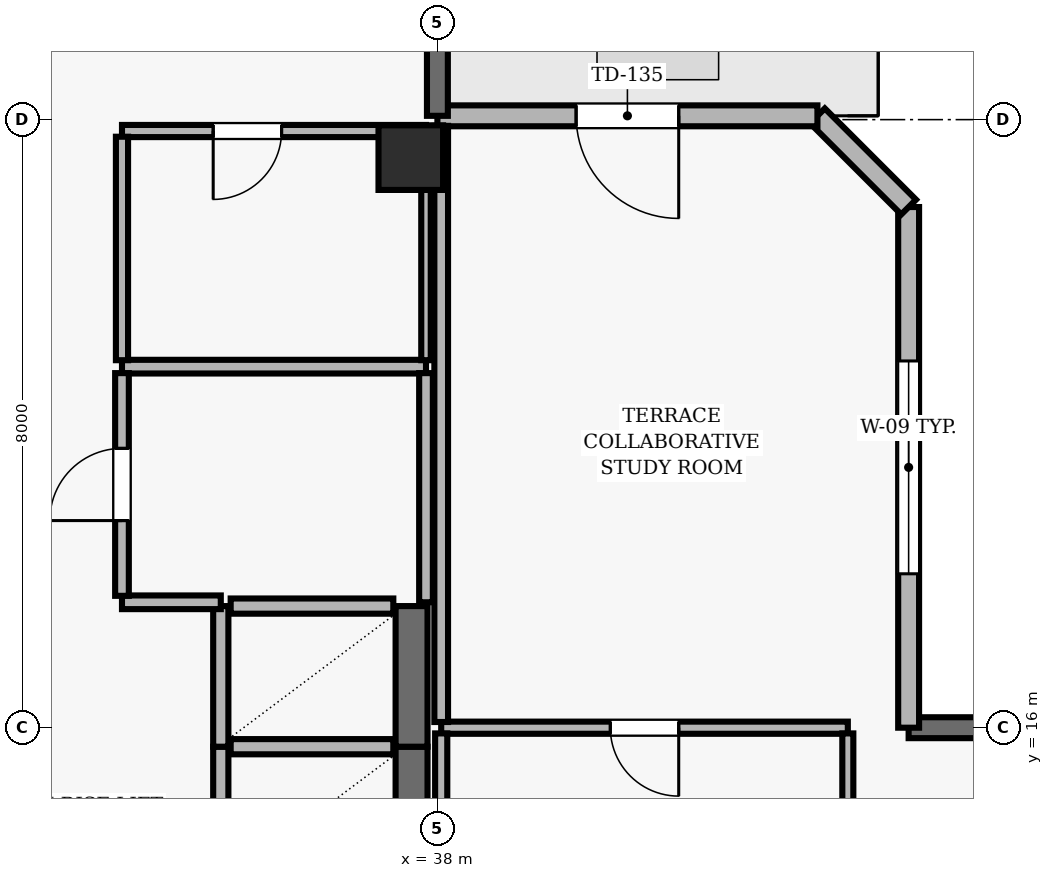
"""IFC4 building model, lengths in metres.
Left out: names, types, materials, properties, quantities, classifications, styles, units other than length and angle.
Written with IfcOpenShell. Run it as: python <this file> out.ifc"""

import sys

from ifc_helpers import new_model, si_unit, direction, frame, frame_2d, origin, origin_2d, place, context, subcontext, project, spatial, rectangle, extrude, element, fill, save


model = new_model("IFC4")
c1 = context("Model", 3, precision=1e-05, world=origin(), true_north=direction((0.0, 1.0)))
c2 = subcontext(c1, "Body", "Model", "MODEL_VIEW")
j1 = project(units=[si_unit("LENGTHUNIT", "METRE"), si_unit("PLANEANGLEUNIT", "RADIAN")], contexts=[c1])
p1 = place(None, origin())
s1 = spatial("IfcSite", under=j1, at=p1, CompositionType="ELEMENT")
p2 = place(p1, origin())
s2 = spatial("IfcBuilding", under=s1, at=p2, CompositionType="ELEMENT")
p3 = place(p2, frame((0.0, 0.0, 259.9)))
s3 = spatial("IfcBuildingStorey", under=s2, at=p3, CompositionType="ELEMENT", Elevation=259.9)
p4 = place(p3, frame((37.65, 23.5, 0.0), z_axis=(0.0, 0.0, 1.0), x_axis=(1.0, 0.0, 0.0)))
e1 = element("IfcColumn", 1, at=p4, inside=s3, PredefinedType="COLUMN", context=c2, shape_type="SweptSolid", body=[
    extrude(rectangle(XDim=0.85, YDim=0.85, at=origin_2d()), origin(), (0.0, 0.0, 1.0), 3.9),
])
p5 = place(p3, frame((57.3, 16.0, 0.0), z_axis=(0.0, 0.0, 1.0), x_axis=(-1.0, 0.0, 0.0)))
e2 = element("IfcWall", 2, at=p5, inside=s3, PredefinedType="SOLIDWALL", context=c2, shape_type="SweptSolid", body=[
    extrude(rectangle(XDim=13.1, YDim=0.275, at=frame_2d((6.55, 0.0))), origin(), (0.0, 0.0, 1.0), 3.69),
])
p6 = place(p5, frame((7.83, 0.0, 0.0)))
e3 = element("IfcOpeningElement", 3, at=p6, cuts=e2, PredefinedType="OPENING", context=c2, shape_type="SweptSolid", body=[
    extrude(rectangle(XDim=1.0, YDim=2.2, at=frame_2d((0.5, 1.1))), frame((0.0, 0.147, 0.0), z_axis=(0.0, -1.0, 0.0), x_axis=(1.0, 0.0, 0.0)), (0.0, 0.0, 1.0), 0.295),
])
p7 = place(p5, frame((2.075, 0.0, 0.9)))
e4 = element("IfcOpeningElement", 4, at=p7, cuts=e2, PredefinedType="OPENING", context=c2, shape_type="SweptSolid", body=[
    extrude(rectangle(XDim=2.4, YDim=1.8, at=frame_2d((1.2, 0.9))), frame((0.0, 0.147, 0.0), z_axis=(0.0, -1.0, 0.0), x_axis=(1.0, 0.0, 0.0)), (0.0, 0.0, 1.0), 0.295),
])
p8 = place(p5, frame((9.525, 0.0, 0.9)))
e5 = element("IfcOpeningElement", 5, at=p8, cuts=e2, PredefinedType="OPENING", context=c2, shape_type="SweptSolid", body=[
    extrude(rectangle(XDim=2.4, YDim=1.8, at=frame_2d((1.2, 0.9))), frame((0.0, 0.147, 0.0), z_axis=(0.0, -1.0, 0.0), x_axis=(1.0, 0.0, 0.0)), (0.0, 0.0, 1.0), 0.295),
])
p9 = place(p3, frame((44.2, 16.0, 0.0), z_axis=(0.0, 0.0, 1.0), x_axis=(0.0, 1.0, 0.0)))
e6 = element("IfcWall", 6, at=p9, inside=s3, PredefinedType="SOLIDWALL", context=c2, shape_type="SweptSolid", body=[
    extrude(rectangle(XDim=6.85, YDim=0.275, at=frame_2d((3.425, 0.0))), origin(), (0.0, 0.0, 1.0), 3.69),
])
p10 = place(p9, frame((2.025, 0.0, 0.9)))
e7 = element("IfcOpeningElement", 7, at=p10, cuts=e6, PredefinedType="OPENING", context=c2, shape_type="SweptSolid", body=[
    extrude(rectangle(XDim=2.8, YDim=1.8, at=frame_2d((1.4, 0.9))), frame((0.0, 0.147, 0.0), z_axis=(0.0, -1.0, 0.0), x_axis=(1.0, 0.0, 0.0)), (0.0, 0.0, 1.0), 0.295),
])
p11 = place(p3, frame((44.2, 22.85, 0.0), z_axis=(0.0, 0.0, 1.0), x_axis=(-0.707106781187, 0.707106781187, 0.0)))
e8 = element("IfcWall", 8, at=p11, inside=s3, PredefinedType="SOLIDWALL", context=c2, shape_type="SweptSolid", body=[
    extrude(rectangle(XDim=1.697, YDim=0.275, at=frame_2d((0.849, 0.0))), origin(), (0.0, 0.0, 1.0), 3.69),
])
p12 = place(p3, frame((43.0, 24.05, 0.0), z_axis=(0.0, 0.0, 1.0), x_axis=(-1.0, 0.0, 0.0)))
e9 = element("IfcWall", 9, at=p12, inside=s3, PredefinedType="SOLIDWALL", context=c2, shape_type="SweptSolid", body=[
    extrude(rectangle(XDim=5.0, YDim=0.275, at=frame_2d((2.5, 0.0))), origin(), (0.0, 0.0, 1.0), 3.69),
])
p13 = place(p12, frame((1.825, 0.0, 0.0)))
e10 = element("IfcOpeningElement", 10, at=p13, cuts=e9, PredefinedType="OPENING", context=c2, shape_type="SweptSolid", body=[
    extrude(rectangle(XDim=1.35, YDim=2.2, at=frame_2d((0.675, 1.1))), frame((0.0, 0.147, 0.0), z_axis=(0.0, -1.0, 0.0), x_axis=(1.0, 0.0, 0.0)), (0.0, 0.0, 1.0), 0.295),
])
p14 = place(p3, frame((38.0, 24.05, 0.0), z_axis=(0.0, 0.0, 1.0), x_axis=(0.0, 1.0, 0.0)))
e11 = element("IfcWall", 11, at=p14, inside=s3, PredefinedType="SOLIDWALL", context=c2, shape_type="SweptSolid", body=[
    extrude(rectangle(XDim=11.25, YDim=0.275, at=frame_2d((5.625, 0.0))), origin(), (0.0, 0.0, 1.0), 3.69),
])
p15 = place(p14, frame((8.15, 0.0, 0.0)))
e12 = element("IfcOpeningElement", 12, at=p15, cuts=e11, PredefinedType="OPENING", context=c2, shape_type="SweptSolid", body=[
    extrude(rectangle(XDim=1.0, YDim=2.2, at=frame_2d((0.5, 1.1))), frame((0.0, 0.147, 0.0), z_axis=(0.0, -1.0, 0.0), x_axis=(1.0, 0.0, 0.0)), (0.0, 0.0, 1.0), 0.295),
])
p16 = place(p3, frame((35.15, 15.75, 0.0), z_axis=(0.0, 0.0, 1.0), x_axis=(0.0, -1.0, 0.0)))
e13 = element("IfcWall", 13, at=p16, inside=s3, PredefinedType="SOLIDWALL", context=c2, shape_type="SweptSolid", body=[
    extrude(rectangle(XDim=1.85, YDim=0.2, at=frame_2d((0.925, 0.0))), origin(), (0.0, 0.0, 1.0), 3.69),
])
p17 = place(p3, frame((37.66, 13.9, 0.0), z_axis=(0.0, 0.0, 1.0), x_axis=(0.0, 1.0, 0.0)))
e14 = element("IfcWall", 14, at=p17, inside=s3, PredefinedType="SHEAR", context=c2, shape_type="SweptSolid", body=[
    extrude(rectangle(XDim=1.85, YDim=0.42, at=frame_2d((0.925, 0.0))), origin(), (0.0, 0.0, 1.0), 3.69),
])
p18 = place(p3, frame((37.42, 15.75, 0.0), z_axis=(0.0, 0.0, 1.0), x_axis=(-1.0, 0.0, 0.0)))
e15 = element("IfcWall", 15, at=p18, inside=s3, PredefinedType="SOLIDWALL", context=c2, shape_type="SweptSolid", body=[
    extrude(rectangle(XDim=2.14, YDim=0.2, at=frame_2d((1.07, 0.0))), origin(), (0.0, 0.0, 1.0), 3.69),
])
p19 = place(p3, frame((35.15, 17.6, 0.0), z_axis=(0.0, 0.0, 1.0), x_axis=(0.0, -1.0, 0.0)))
e16 = element("IfcWall", 16, at=p19, inside=s3, PredefinedType="SOLIDWALL", context=c2, shape_type="SweptSolid", body=[
    extrude(rectangle(XDim=1.85, YDim=0.2, at=frame_2d((0.925, 0.0))), origin(), (0.0, 0.0, 1.0), 3.69),
])
p20 = place(p3, frame((37.66, 15.75, 0.0), z_axis=(0.0, 0.0, 1.0), x_axis=(0.0, 1.0, 0.0)))
e17 = element("IfcWall", 17, at=p20, inside=s3, PredefinedType="SHEAR", context=c2, shape_type="SweptSolid", body=[
    extrude(rectangle(XDim=1.85, YDim=0.42, at=frame_2d((0.925, 0.0))), origin(), (0.0, 0.0, 1.0), 3.69),
])
p21 = place(p3, frame((37.42, 17.6, 0.0), z_axis=(0.0, 0.0, 1.0), x_axis=(-1.0, 0.0, 0.0)))
e18 = element("IfcWall", 18, at=p21, inside=s3, PredefinedType="SOLIDWALL", context=c2, shape_type="SweptSolid", body=[
    extrude(rectangle(XDim=2.14, YDim=0.2, at=frame_2d((1.07, 0.0))), origin(), (0.0, 0.0, 1.0), 3.69),
])
p22 = place(p3, frame((33.85, 17.65, 0.0), z_axis=(0.0, 0.0, 1.0), x_axis=(1.0, 0.0, 0.0)))
e19 = element("IfcWall", 19, at=p22, inside=s3, PredefinedType="PARTITIONING", context=c2, shape_type="SweptSolid", body=[
    extrude(rectangle(XDim=1.3, YDim=0.18, at=frame_2d((0.65, 0.0))), origin(), (0.0, 0.0, 1.0), 3.69),
])
p23 = place(p3, frame((37.85, 20.75, 0.0), z_axis=(0.0, 0.0, 1.0), x_axis=(-1.0, 0.0, 0.0)))
e20 = element("IfcWall", 20, at=p23, inside=s3, PredefinedType="PARTITIONING", context=c2, shape_type="SweptSolid", body=[
    extrude(rectangle(XDim=4.0, YDim=0.18, at=frame_2d((2.0, 0.0))), origin(), (0.0, 0.0, 1.0), 3.69),
])
p24 = place(p3, frame((37.85, 23.85, 0.0), z_axis=(0.0, 0.0, 1.0), x_axis=(-1.0, 0.0, 0.0)))
e21 = element("IfcWall", 21, at=p24, inside=s3, PredefinedType="PARTITIONING", context=c2, shape_type="SweptSolid", body=[
    extrude(rectangle(XDim=4.0, YDim=0.16, at=frame_2d((2.0, 0.0))), origin(), (0.0, 0.0, 1.0), 3.227),
])
p25 = place(p24, frame((1.9, 0.0, 0.0)))
e22 = element("IfcOpeningElement", 22, at=p25, cuts=e21, PredefinedType="OPENING", context=c2, shape_type="SweptSolid", body=[
    extrude(rectangle(XDim=0.9, YDim=2.1, at=frame_2d((0.45, 1.05))), frame((0.0, 0.09, 0.0), z_axis=(0.0, -1.0, 0.0), x_axis=(1.0, 0.0, 0.0)), (0.0, 0.0, 1.0), 0.18),
])
p26 = place(p3, frame((43.4, 16.0, 0.0), z_axis=(0.0, 0.0, 1.0), x_axis=(-1.0, 0.0, 0.0)))
e23 = element("IfcWall", 23, at=p26, inside=s3, PredefinedType="PARTITIONING", context=c2, shape_type="SweptSolid", body=[
    extrude(rectangle(XDim=5.35, YDim=0.16, at=frame_2d((2.675, 0.0))), origin(), (0.0, 0.0, 1.0), 3.39),
])
p27 = place(p26, frame((2.225, 0.0, 0.0)))
e24 = element("IfcOpeningElement", 24, at=p27, cuts=e23, PredefinedType="OPENING", context=c2, shape_type="SweptSolid", body=[
    extrude(rectangle(XDim=0.9, YDim=2.1, at=frame_2d((0.45, 1.05))), frame((0.0, 0.09, 0.0), z_axis=(0.0, -1.0, 0.0), x_axis=(1.0, 0.0, 0.0)), (0.0, 0.0, 1.0), 0.18),
])
p28 = place(p3, frame((33.85, 17.735, 0.0), z_axis=(0.0, 0.0, 1.0), x_axis=(0.0, 1.0, 0.0)))
e25 = element("IfcWall", 25, at=p28, inside=s3, PredefinedType="PARTITIONING", context=c2, shape_type="SweptSolid", body=[
    extrude(rectangle(XDim=2.93, YDim=0.18, at=frame_2d((1.465, 0.0))), origin(), (0.0, 0.0, 1.0), 3.69),
])
p29 = place(p28, frame((0.99, 0.0, 0.0)))
e26 = element("IfcOpeningElement", 26, at=p29, cuts=e25, PredefinedType="OPENING", context=c2, shape_type="SweptSolid", body=[
    extrude(rectangle(XDim=0.95, YDim=2.1, at=frame_2d((0.475, 1.05))), frame((0.0, 0.1, 0.0), z_axis=(0.0, -1.0, 0.0), x_axis=(1.0, 0.0, 0.0)), (0.0, 0.0, 1.0), 0.2),
])
p30 = place(p3, frame((33.85, 20.835, 0.0), z_axis=(0.0, 0.0, 1.0), x_axis=(0.0, 1.0, 0.0)))
e27 = element("IfcWall", 27, at=p30, inside=s3, PredefinedType="PARTITIONING", context=c2, shape_type="SweptSolid", body=[
    extrude(rectangle(XDim=2.94, YDim=0.16, at=frame_2d((1.47, 0.0))), origin(), (0.0, 0.0, 1.0), 3.69),
])
p31 = place(p3, frame((37.85, 17.65, 0.0), z_axis=(0.0, 0.0, 1.0), x_axis=(0.0, 1.0, 0.0)))
e28 = element("IfcWall", 28, at=p31, inside=s3, PredefinedType="PARTITIONING", context=c2, shape_type="SweptSolid", body=[
    extrude(rectangle(XDim=3.015, YDim=0.18, at=frame_2d((1.508, 0.0))), origin(), (0.0, 0.0, 1.0), 3.227),
])
p32 = place(p3, frame((37.85, 20.835, 0.0), z_axis=(0.0, 0.0, 1.0), x_axis=(0.0, 1.0, 0.0)))
e29 = element("IfcWall", 29, at=p32, inside=s3, PredefinedType="PARTITIONING", context=c2, shape_type="SweptSolid", body=[
    extrude(rectangle(XDim=2.94, YDim=0.125, at=frame_2d((1.47, 0.0))), origin(), (0.0, 0.0, 1.0), 3.227),
])
p33 = place(p3, frame((38.05, 15.925, 0.0), z_axis=(0.0, 0.0, 1.0), x_axis=(0.0, -1.0, 0.0)))
e30 = element("IfcWall", 30, at=p33, inside=s3, PredefinedType="PARTITIONING", context=c2, shape_type="SweptSolid", body=[
    extrude(rectangle(XDim=6.375, YDim=0.16, at=frame_2d((3.188, 0.0))), origin(), (0.0, 0.0, 1.0), 3.227),
])
p34 = place(p3, frame((38.05, 23.918, 0.0), z_axis=(0.0, 0.0, 1.0), x_axis=(0.0, -1.0, 0.0)))
e31 = element("IfcWall", 31, at=p34, inside=s3, PredefinedType="PARTITIONING", context=c2, shape_type="SweptSolid", body=[
    extrude(rectangle(XDim=7.843, YDim=0.18, at=frame_2d((3.921, 0.0))), origin(), (0.0, 0.0, 1.0), 3.227),
])
p35 = place(p3, frame((43.4, 10.418, 0.0), z_axis=(0.0, 0.0, 1.0), x_axis=(0.0, 1.0, 0.0)))
e32 = element("IfcWall", 32, at=p35, inside=s3, PredefinedType="PARTITIONING", context=c2, shape_type="SweptSolid", body=[
    extrude(rectangle(XDim=5.507, YDim=0.145, at=frame_2d((2.753, 0.0))), origin(), (0.0, 0.0, 1.0), 3.69),
])
p36 = place(p10, origin())
e33 = element("IfcWindow", 33, at=p36, inside=s3, PartitioningType="SINGLE_PANEL", PredefinedType="WINDOW", context=c2, shape_type="SweptSolid", body=[
    extrude(rectangle(XDim=2.8, YDim=1.8, at=frame_2d((1.4, 0.9))), frame((0.0, 0.03, 0.0), z_axis=(0.0, -1.0, 0.0), x_axis=(1.0, 0.0, 0.0)), (0.0, 0.0, 1.0), 0.06),
])
fill(e7, e33)
p37 = place(p13, origin())
e34 = element("IfcDoor", 34, at=p37, inside=s3, OperationType="SINGLE_SWING_LEFT", PredefinedType="DOOR", context=c2, shape_type="SweptSolid", body=[
    extrude(rectangle(XDim=1.35, YDim=2.2, at=frame_2d((0.675, 1.1))), frame((0.0, 0.025, 0.0), z_axis=(0.0, -1.0, 0.0), x_axis=(1.0, 0.0, 0.0)), (0.0, 0.0, 1.0), 0.05),
])
fill(e10, e34)
p38 = place(p29, origin())
e35 = element("IfcDoor", 35, at=p38, inside=s3, OperationType="SINGLE_SWING_LEFT", PredefinedType="DOOR", context=c2, shape_type="SweptSolid", body=[
    extrude(rectangle(XDim=0.95, YDim=2.1, at=frame_2d((0.475, 1.05))), frame((0.0, 0.025, 0.0), z_axis=(0.0, -1.0, 0.0), x_axis=(1.0, 0.0, 0.0)), (0.0, 0.0, 1.0), 0.05),
])
fill(e26, e35)
p39 = place(p25, origin())
e36 = element("IfcDoor", 36, at=p39, inside=s3, OperationType="SINGLE_SWING_RIGHT", PredefinedType="DOOR", context=c2, shape_type="SweptSolid", body=[
    extrude(rectangle(XDim=0.9, YDim=2.1, at=frame_2d((0.45, 1.05))), frame((0.0, 0.025, 0.0), z_axis=(0.0, -1.0, 0.0), x_axis=(1.0, 0.0, 0.0)), (0.0, 0.0, 1.0), 0.05),
])
fill(e22, e36)
p40 = place(p27, origin())
e37 = element("IfcDoor", 37, at=p40, inside=s3, OperationType="SINGLE_SWING_LEFT", PredefinedType="DOOR", context=c2, shape_type="SweptSolid", body=[
    extrude(rectangle(XDim=0.9, YDim=2.1, at=frame_2d((0.45, 1.05))), frame((0.0, 0.025, 0.0), z_axis=(0.0, -1.0, 0.0), x_axis=(1.0, 0.0, 0.0)), (0.0, 0.0, 1.0), 0.05),
])
fill(e24, e37)
save(model, sys.argv[1])
